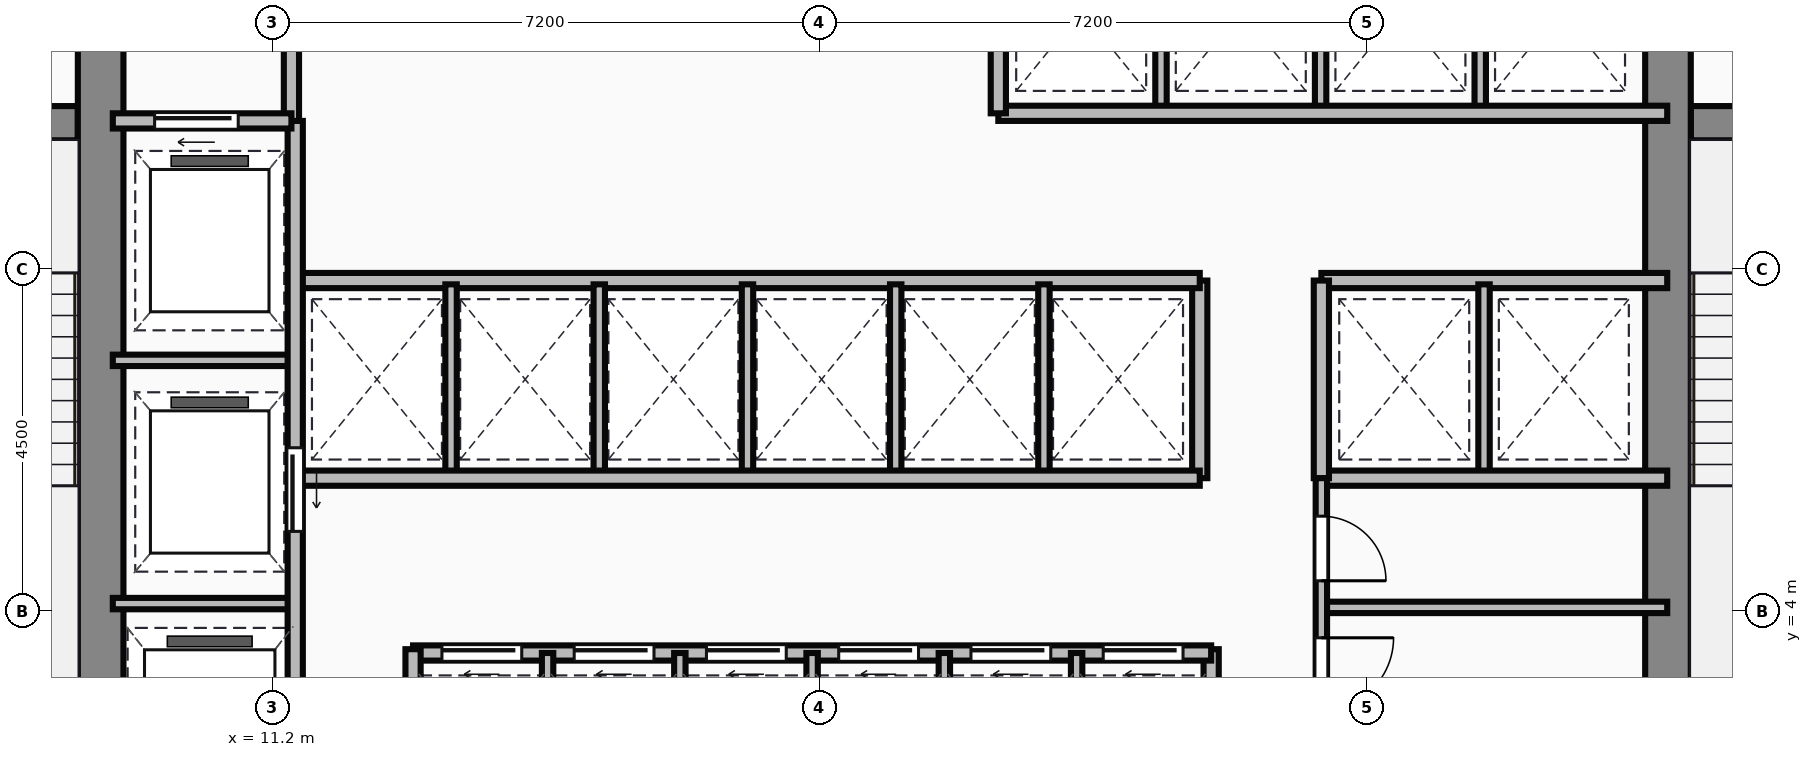
"""IFC4 building model, lengths in metres.
Left out: names, types, materials, properties, quantities, classifications, styles, units other than length and angle.
Written with IfcOpenShell. Run it as: python <this file> out.ifc"""

import sys

from ifc_helpers import new_model, si_unit, direction, frame, frame_2d, origin, place, context, subcontext, project, spatial, rectangle, extrude, source, transform, mapped, element, fill, save


model = new_model("IFC4")
c1 = context("Model", 3, precision=1e-05, world=origin(), true_north=direction((0.0, 1.0)))
c2 = subcontext(c1, "Body", "Model", "MODEL_VIEW")
j1 = project(units=[si_unit("LENGTHUNIT", "METRE"), si_unit("PLANEANGLEUNIT", "RADIAN")], contexts=[c1])
p1 = place(None, origin())
s1 = spatial("IfcSite", under=j1, at=p1, CompositionType="ELEMENT")
p2 = place(p1, origin())
s2 = spatial("IfcBuilding", under=s1, at=p2, CompositionType="ELEMENT")
p3 = place(p2, frame((0.0, 0.0, 69.0)))
s3 = spatial("IfcBuildingStorey", under=s2, at=p3, CompositionType="ELEMENT", Elevation=69.0)
m1 = source(origin(), c2, "Body", "SweptSolid", [
    extrude(rectangle(XDim=12.2, YDim=0.6, at=frame_2d((6.1, 0.0))), origin(), (0.0, 0.0, 1.0), 3.65),
])
for number, where, z_axis, x_axis in (
    (1, (8.94, 0.9, 0.0), (0.0, 0.0, 1.0), (0.0, 1.0, 0.0)),
    (2, (29.56, 0.9, 0.0), (0.0, 0.0, 1.0), (0.0, 1.0, 0.0)),
):
    element("IfcWall", number, at=place(p3, frame(where, z_axis=z_axis, x_axis=x_axis)), inside=s3, PredefinedType="SHEAR", context=c2, shape_type="MappedRepresentation", body=[
        mapped(m1, transform((0.0, 0.0, 0.0))),
    ])
m2 = source(origin(), c2, "Body", "SweptSolid", [
    extrude(rectangle(XDim=3.39, YDim=0.45, at=frame_2d((1.695, 0.0))), origin(), (0.0, 0.0, 1.0), 3.65),
])
p4 = place(p3, frame((5.25, 10.42, 0.0), z_axis=(0.0, 0.0, 1.0), x_axis=(1.0, 0.0, 0.0)))
e3 = element("IfcWall", 3, at=p4, inside=s3, PredefinedType="SHEAR", context=c2, shape_type="MappedRepresentation", body=[
    mapped(m2, transform((0.0, 0.0, 0.0))),
])
p5 = place(p4, frame((1.05, 0.0, 0.0)))
e4 = element("IfcOpeningElement", 4, at=p5, cuts=e3, PredefinedType="OPENING", context=c2, shape_type="SweptSolid", body=[
    extrude(rectangle(XDim=1.1, YDim=2.15, at=frame_2d((0.55, 1.075))), frame((0.0, 0.235, 0.0), z_axis=(0.0, -1.0, 0.0), x_axis=(1.0, 0.0, 0.0)), (0.0, 0.0, 1.0), 0.47),
])
p6 = place(p3, frame((29.86, 10.42, 0.0), z_axis=(0.0, 0.0, 1.0), x_axis=(1.0, 0.0, 0.0)))
e5 = element("IfcWall", 5, at=p6, inside=s3, PredefinedType="SHEAR", context=c2, shape_type="MappedRepresentation", body=[
    mapped(m2, transform((0.0, 0.0, 0.0))),
])
p7 = place(p6, frame((1.1, 0.0, 0.0)))
e6 = element("IfcOpeningElement", 6, at=p7, cuts=e5, PredefinedType="OPENING", context=c2, shape_type="SweptSolid", body=[
    extrude(rectangle(XDim=1.1, YDim=2.15, at=frame_2d((0.55, 1.075))), frame((0.0, 0.235, 0.0), z_axis=(0.0, -1.0, 0.0), x_axis=(1.0, 0.0, 0.0)), (0.0, 0.0, 1.0), 0.47),
])
m3 = source(origin(), c2, "Body", "SweptSolid", [
    extrude(rectangle(XDim=3.18, YDim=0.2, at=frame_2d((1.59, 0.0))), origin(), (0.0, 0.0, 1.0), 3.4),
])
p8 = place(p3, frame((11.45, 10.42, 0.0), z_axis=(0.0, 0.0, 1.0), x_axis=(0.0, 1.0, 0.0)))
e7 = element("IfcWall", 7, at=p8, inside=s3, PredefinedType="PARTITIONING", context=c2, shape_type="MappedRepresentation", body=[
    mapped(m3, transform((0.0, 0.0, 0.0))),
])
m4 = source(origin(), c2, "Body", "SweptSolid", [
    extrude(rectangle(XDim=2.35, YDim=0.2, at=frame_2d((1.175, 0.0))), origin(), (0.0, 0.0, 1.0), 3.4),
])
p9 = place(p3, frame((9.1, 10.45, 0.0), z_axis=(0.0, 0.0, 1.0), x_axis=(1.0, 0.0, 0.0)))
e8 = element("IfcWall", 8, at=p9, inside=s3, PredefinedType="PARTITIONING", context=c2, shape_type="MappedRepresentation", body=[
    mapped(m4, transform((0.0, 0.0, 0.0))),
])
p10 = place(p9, frame((0.55, 0.0, 0.0)))
e9 = element("IfcOpeningElement", 9, at=p10, cuts=e8, PredefinedType="OPENING", context=c2, shape_type="SweptSolid", body=[
    extrude(rectangle(XDim=1.1, YDim=2.15, at=frame_2d((0.55, 1.075))), frame((0.0, 0.11, 0.0), z_axis=(0.0, -1.0, 0.0), x_axis=(1.0, 0.0, 0.0)), (0.0, 0.0, 1.0), 0.22),
])
m5 = source(origin(), c2, "Body", "SweptSolid", [
    extrude(rectangle(XDim=9.6, YDim=0.2, at=frame_2d((4.8, 0.0))), origin(), (0.0, 0.0, 1.0), 3.4),
])
p11 = place(p3, frame((11.5, 0.85, 0.0), z_axis=(0.0, 0.0, 1.0), x_axis=(0.0, 1.0, 0.0)))
e10 = element("IfcWall", 10, at=p11, inside=s3, PredefinedType="PARTITIONING", context=c2, shape_type="MappedRepresentation", body=[
    mapped(m5, transform((0.0, 0.0, 0.0))),
])
p12 = place(p11, frame((4.2, 0.0, 0.0)))
e11 = element("IfcOpeningElement", 11, at=p12, cuts=e10, PredefinedType="OPENING", context=c2, shape_type="SweptSolid", body=[
    extrude(rectangle(XDim=1.1, YDim=2.15, at=frame_2d((0.55, 1.075))), frame((0.0, 0.11, 0.0), z_axis=(0.0, -1.0, 0.0), x_axis=(1.0, 0.0, 0.0)), (0.0, 0.0, 1.0), 0.22),
])
p13 = place(p11, frame((0.9, 0.0, 0.0)))
e12 = element("IfcOpeningElement", 12, at=p13, cuts=e10, PredefinedType="OPENING", context=c2, shape_type="SweptSolid", body=[
    extrude(rectangle(XDim=1.2, YDim=2.15, at=frame_2d((0.6, 1.075))), frame((0.0, 0.11, 0.0), z_axis=(0.0, -1.0, 0.0), x_axis=(1.0, 0.0, 0.0)), (0.0, 0.0, 1.0), 0.22),
])
m6 = source(origin(), c2, "Body", "SweptSolid", [
    extrude(rectangle(XDim=2.4, YDim=0.15, at=frame_2d((1.2, 0.0))), origin(), (0.0, 0.0, 1.0), 3.4),
])
for number, where, z_axis, x_axis in (
    (13, (9.1, 4.1, 0.0), (0.0, 0.0, 1.0), (1.0, 0.0, 0.0)),
    (14, (9.1, 7.3, 0.0), (0.0, 0.0, 1.0), (1.0, 0.0, 0.0)),
):
    element("IfcWall", number, at=place(p3, frame(where, z_axis=z_axis, x_axis=x_axis)), inside=s3, PredefinedType="PARTITIONING", context=c2, shape_type="MappedRepresentation", body=[
        mapped(m6, transform((0.0, 0.0, 0.0))),
    ])
m7 = source(origin(), c2, "Body", "SweptSolid", [
    extrude(rectangle(XDim=2.65, YDim=0.2, at=frame_2d((1.325, 0.0))), origin(), (0.0, 0.0, 1.0), 3.4),
])
p14 = place(p3, frame((13.05, 0.85, 0.0), z_axis=(0.0, 0.0, 1.0), x_axis=(0.0, 1.0, 0.0)))
e15 = element("IfcWall", 15, at=p14, inside=s3, PredefinedType="PARTITIONING", context=c2, shape_type="MappedRepresentation", body=[
    mapped(m7, transform((0.0, 0.0, 0.0))),
])
m8 = source(origin(), c2, "Body", "SweptSolid", [
    extrude(rectangle(XDim=10.5, YDim=0.2, at=frame_2d((5.25, 0.0))), origin(), (0.0, 0.0, 1.0), 3.4),
])
p15 = place(p3, frame((13.05, 3.45, 0.0), z_axis=(0.0, 0.0, 1.0), x_axis=(1.0, 0.0, 0.0)))
e16 = element("IfcWall", 16, at=p15, inside=s3, PredefinedType="PARTITIONING", context=c2, shape_type="MappedRepresentation", body=[
    mapped(m8, transform((0.0, 0.0, 0.0))),
])
p16 = place(p15, frame((0.38, 0.0, 0.0)))
e17 = element("IfcOpeningElement", 17, at=p16, cuts=e16, PredefinedType="OPENING", context=c2, shape_type="SweptSolid", body=[
    extrude(rectangle(XDim=1.05, YDim=2.15, at=frame_2d((0.525, 1.075))), frame((0.0, 0.11, 0.0), z_axis=(0.0, -1.0, 0.0), x_axis=(1.0, 0.0, 0.0)), (0.0, 0.0, 1.0), 0.22),
])
p17 = place(p15, frame((2.12, 0.0, 0.0)))
e18 = element("IfcOpeningElement", 18, at=p17, cuts=e16, PredefinedType="OPENING", context=c2, shape_type="SweptSolid", body=[
    extrude(rectangle(XDim=1.05, YDim=2.15, at=frame_2d((0.525, 1.075))), frame((0.0, 0.11, 0.0), z_axis=(0.0, -1.0, 0.0), x_axis=(1.0, 0.0, 0.0)), (0.0, 0.0, 1.0), 0.22),
])
p18 = place(p15, frame((3.86, 0.0, 0.0)))
e19 = element("IfcOpeningElement", 19, at=p18, cuts=e16, PredefinedType="OPENING", context=c2, shape_type="SweptSolid", body=[
    extrude(rectangle(XDim=1.05, YDim=2.15, at=frame_2d((0.525, 1.075))), frame((0.0, 0.11, 0.0), z_axis=(0.0, -1.0, 0.0), x_axis=(1.0, 0.0, 0.0)), (0.0, 0.0, 1.0), 0.22),
])
p19 = place(p15, frame((5.6, 0.0, 0.0)))
e20 = element("IfcOpeningElement", 20, at=p19, cuts=e16, PredefinedType="OPENING", context=c2, shape_type="SweptSolid", body=[
    extrude(rectangle(XDim=1.05, YDim=2.15, at=frame_2d((0.525, 1.075))), frame((0.0, 0.11, 0.0), z_axis=(0.0, -1.0, 0.0), x_axis=(1.0, 0.0, 0.0)), (0.0, 0.0, 1.0), 0.22),
])
p20 = place(p15, frame((7.34, 0.0, 0.0)))
e21 = element("IfcOpeningElement", 21, at=p20, cuts=e16, PredefinedType="OPENING", context=c2, shape_type="SweptSolid", body=[
    extrude(rectangle(XDim=1.05, YDim=2.15, at=frame_2d((0.525, 1.075))), frame((0.0, 0.11, 0.0), z_axis=(0.0, -1.0, 0.0), x_axis=(1.0, 0.0, 0.0)), (0.0, 0.0, 1.0), 0.22),
])
p21 = place(p15, frame((9.08, 0.0, 0.0)))
e22 = element("IfcOpeningElement", 22, at=p21, cuts=e16, PredefinedType="OPENING", context=c2, shape_type="SweptSolid", body=[
    extrude(rectangle(XDim=1.05, YDim=2.15, at=frame_2d((0.525, 1.075))), frame((0.0, 0.11, 0.0), z_axis=(0.0, -1.0, 0.0), x_axis=(1.0, 0.0, 0.0)), (0.0, 0.0, 1.0), 0.22),
])
p22 = place(p3, frame((23.55, 0.85, 0.0), z_axis=(0.0, 0.0, 1.0), x_axis=(0.0, 1.0, 0.0)))
e23 = element("IfcWall", 23, at=p22, inside=s3, PredefinedType="PARTITIONING", context=c2, shape_type="MappedRepresentation", body=[
    mapped(m7, transform((0.0, 0.0, 0.0))),
])
m9 = source(origin(), c2, "Body", "SweptSolid", [
    extrude(rectangle(XDim=2.6, YDim=0.15, at=frame_2d((1.3, 0.0))), origin(), (0.0, 0.0, 1.0), 3.4),
])
for number, where, z_axis, x_axis in (
    (24, (14.82, 0.85, 0.0), (0.0, 0.0, 1.0), (0.0, 1.0, 0.0)),
    (25, (16.56, 0.85, 0.0), (0.0, 0.0, 1.0), (0.0, 1.0, 0.0)),
    (26, (18.3, 0.85, 0.0), (0.0, 0.0, 1.0), (0.0, 1.0, 0.0)),
    (27, (20.04, 0.85, 0.0), (0.0, 0.0, 1.0), (0.0, 1.0, 0.0)),
    (28, (21.78, 0.85, 0.0), (0.0, 0.0, 1.0), (0.0, 1.0, 0.0)),
):
    element("IfcWall", number, at=place(p3, frame(where, z_axis=z_axis, x_axis=x_axis)), inside=s3, PredefinedType="PARTITIONING", context=c2, shape_type="MappedRepresentation", body=[
        mapped(m9, transform((0.0, 0.0, 0.0))),
    ])
m10 = source(origin(), c2, "Body", "SweptSolid", [
    extrude(rectangle(XDim=11.85, YDim=0.2, at=frame_2d((5.925, 0.0))), origin(), (0.0, 0.0, 1.0), 3.4),
])
for number, where, z_axis, x_axis in (
    (29, (11.55, 5.75, 0.0), (0.0, 0.0, 1.0), (1.0, 0.0, 0.0)),
    (30, (11.55, 8.35, 0.0), (0.0, 0.0, 1.0), (1.0, 0.0, 0.0)),
):
    element("IfcWall", number, at=place(p3, frame(where, z_axis=z_axis, x_axis=x_axis)), inside=s3, PredefinedType="PARTITIONING", context=c2, shape_type="MappedRepresentation", body=[
        mapped(m10, transform((0.0, 0.0, 0.0))),
    ])
m11 = source(origin(), c2, "Body", "SweptSolid", [
    extrude(rectangle(XDim=2.6, YDim=0.2, at=frame_2d((1.3, 0.0))), origin(), (0.0, 0.0, 1.0), 3.4),
])
p23 = place(p3, frame((23.4, 5.75, 0.0), z_axis=(0.0, 0.0, 1.0), x_axis=(0.0, 1.0, 0.0)))
e31 = element("IfcWall", 31, at=p23, inside=s3, PredefinedType="PARTITIONING", context=c2, shape_type="MappedRepresentation", body=[
    mapped(m11, transform((0.0, 0.0, 0.0))),
])
m12 = source(origin(), c2, "Body", "SweptSolid", [
    extrude(rectangle(XDim=2.5, YDim=0.15, at=frame_2d((1.25, 0.0))), origin(), (0.0, 0.0, 1.0), 3.4),
])
for number, where, z_axis, x_axis in (
    (32, (13.55, 5.8, 0.0), (0.0, 0.0, 1.0), (0.0, 1.0, 0.0)),
    (33, (15.5, 5.8, 0.0), (0.0, 0.0, 1.0), (0.0, 1.0, 0.0)),
    (34, (17.45, 5.8, 0.0), (0.0, 0.0, 1.0), (0.0, 1.0, 0.0)),
    (35, (19.4, 5.8, 0.0), (0.0, 0.0, 1.0), (0.0, 1.0, 0.0)),
    (36, (21.35, 5.8, 0.0), (0.0, 0.0, 1.0), (0.0, 1.0, 0.0)),
):
    element("IfcWall", number, at=place(p3, frame(where, z_axis=z_axis, x_axis=x_axis)), inside=s3, PredefinedType="PARTITIONING", context=c2, shape_type="MappedRepresentation", body=[
        mapped(m12, transform((0.0, 0.0, 0.0))),
    ])
m13 = source(origin(), c2, "Body", "SweptSolid", [
    extrude(rectangle(XDim=8.8, YDim=0.2, at=frame_2d((4.4, 0.0))), origin(), (0.0, 0.0, 1.0), 3.4),
])
p24 = place(p3, frame((20.75, 10.55, 0.0), z_axis=(0.0, 0.0, 1.0), x_axis=(1.0, 0.0, 0.0)))
e37 = element("IfcWall", 37, at=p24, inside=s3, PredefinedType="PARTITIONING", context=c2, shape_type="MappedRepresentation", body=[
    mapped(m13, transform((0.0, 0.0, 0.0))),
])
m14 = source(origin(), c2, "Body", "SweptSolid", [
    extrude(rectangle(XDim=3.0, YDim=0.2, at=frame_2d((1.5, 0.0))), origin(), (0.0, 0.0, 1.0), 3.4),
])
p25 = place(p3, frame((20.75, 10.55, 0.0), z_axis=(0.0, 0.0, 1.0), x_axis=(0.0, 1.0, 0.0)))
e38 = element("IfcWall", 38, at=p25, inside=s3, PredefinedType="PARTITIONING", context=c2, shape_type="MappedRepresentation", body=[
    mapped(m14, transform((0.0, 0.0, 0.0))),
])
m15 = source(origin(), c2, "Body", "SweptSolid", [
    extrude(rectangle(XDim=2.85, YDim=0.15, at=frame_2d((1.425, 0.0))), origin(), (0.0, 0.0, 1.0), 3.4),
])
for number, where, z_axis, x_axis in (
    (39, (22.89, 10.6, 0.0), (0.0, 0.0, 1.0), (0.0, 1.0, 0.0)),
    (40, (24.99, 10.6, 0.0), (0.0, 0.0, 1.0), (0.0, 1.0, 0.0)),
    (41, (27.09, 10.6, 0.0), (0.0, 0.0, 1.0), (0.0, 1.0, 0.0)),
):
    element("IfcWall", number, at=place(p3, frame(where, z_axis=z_axis, x_axis=x_axis)), inside=s3, PredefinedType="PARTITIONING", context=c2, shape_type="MappedRepresentation", body=[
        mapped(m15, transform((0.0, 0.0, 0.0))),
    ])
m16 = source(origin(), c2, "Body", "SweptSolid", [
    extrude(rectangle(XDim=4.55, YDim=0.2, at=frame_2d((2.275, 0.0))), origin(), (0.0, 0.0, 1.0), 3.4),
])
for number, where, z_axis, x_axis in (
    (42, (25.0, 8.35, 0.0), (0.0, 0.0, 1.0), (1.0, 0.0, 0.0)),
    (43, (25.0, 5.75, 0.0), (0.0, 0.0, 1.0), (1.0, 0.0, 0.0)),
):
    element("IfcWall", number, at=place(p3, frame(where, z_axis=z_axis, x_axis=x_axis)), inside=s3, PredefinedType="PARTITIONING", context=c2, shape_type="MappedRepresentation", body=[
        mapped(m16, transform((0.0, 0.0, 0.0))),
    ])
p26 = place(p3, frame((25.0, 5.75, 0.0), z_axis=(0.0, 0.0, 1.0), x_axis=(0.0, 1.0, 0.0)))
e44 = element("IfcWall", 44, at=p26, inside=s3, PredefinedType="PARTITIONING", context=c2, shape_type="MappedRepresentation", body=[
    mapped(m11, transform((0.0, 0.0, 0.0))),
])
p27 = place(p3, frame((27.14, 5.8, 0.0), z_axis=(0.0, 0.0, 1.0), x_axis=(0.0, 1.0, 0.0)))
e45 = element("IfcWall", 45, at=p27, inside=s3, PredefinedType="PARTITIONING", context=c2, shape_type="MappedRepresentation", body=[
    mapped(m12, transform((0.0, 0.0, 0.0))),
])
m17 = source(origin(), c2, "Body", "SweptSolid", [
    extrude(rectangle(XDim=4.9, YDim=0.15, at=frame_2d((2.45, 0.0))), origin(), (0.0, 0.0, 1.0), 3.4),
])
p28 = place(p3, frame((25.0, 0.85, 0.0), z_axis=(0.0, 0.0, 1.0), x_axis=(0.0, 1.0, 0.0)))
e46 = element("IfcWall", 46, at=p28, inside=s3, PredefinedType="PARTITIONING", context=c2, shape_type="MappedRepresentation", body=[
    mapped(m17, transform((0.0, 0.0, 0.0))),
])
p29 = place(p28, frame((1.85, 0.0, 0.0)))
e47 = element("IfcOpeningElement", 47, at=p29, cuts=e46, PredefinedType="OPENING", context=c2, shape_type="SweptSolid", body=[
    extrude(rectangle(XDim=0.95, YDim=2.15, at=frame_2d((0.475, 1.075))), frame((0.0, 0.085, 0.0), z_axis=(0.0, -1.0, 0.0), x_axis=(1.0, 0.0, 0.0)), (0.0, 0.0, 1.0), 0.17),
])
p30 = place(p28, frame((3.55, 0.0, 0.0)))
e48 = element("IfcOpeningElement", 48, at=p30, cuts=e46, PredefinedType="OPENING", context=c2, shape_type="SweptSolid", body=[
    extrude(rectangle(XDim=0.85, YDim=2.15, at=frame_2d((0.425, 1.075))), frame((0.0, 0.085, 0.0), z_axis=(0.0, -1.0, 0.0), x_axis=(1.0, 0.0, 0.0)), (0.0, 0.0, 1.0), 0.17),
])
m18 = source(origin(), c2, "Body", "SweptSolid", [
    extrude(rectangle(XDim=4.55, YDim=0.15, at=frame_2d((2.275, 0.0))), origin(), (0.0, 0.0, 1.0), 3.4),
])
p31 = place(p3, frame((25.0, 4.05, 0.0), z_axis=(0.0, 0.0, 1.0), x_axis=(1.0, 0.0, 0.0)))
e49 = element("IfcWall", 49, at=p31, inside=s3, PredefinedType="PARTITIONING", context=c2, shape_type="MappedRepresentation", body=[
    mapped(m18, transform((0.0, 0.0, 0.0))),
])
m19 = source(origin(), c2, "Body", "SweptSolid", [
    extrude(rectangle(XDim=1.1, YDim=2.15, at=frame_2d((0.55, 1.075))), frame((0.0, 0.025, 0.0), z_axis=(0.0, -1.0, 0.0), x_axis=(1.0, 0.0, 0.0)), (0.0, 0.0, 1.0), 0.05),
])
p32 = place(p10, origin())
e50 = element("IfcDoor", 50, at=p32, inside=s3, OperationType="SLIDING_TO_LEFT", PredefinedType="DOOR", context=c2, shape_type="MappedRepresentation", body=[
    mapped(m19, transform((0.0, 0.0, 0.0))),
])
fill(e9, e50)
p33 = place(p12, frame((1.1, 0.0, 0.0), z_axis=(0.0, 0.0, 1.0), x_axis=(-1.0, 0.0, 0.0)))
e51 = element("IfcDoor", 51, at=p33, inside=s3, OperationType="SLIDING_TO_LEFT", PredefinedType="DOOR", context=c2, shape_type="MappedRepresentation", body=[
    mapped(m19, transform((0.0, 0.0, 0.0))),
])
fill(e11, e51)
m20 = source(origin(), c2, "Body", "SweptSolid", [
    extrude(rectangle(XDim=1.05, YDim=2.15, at=frame_2d((0.525, 1.075))), frame((0.0, 0.025, 0.0), z_axis=(0.0, -1.0, 0.0), x_axis=(1.0, 0.0, 0.0)), (0.0, 0.0, 1.0), 0.05),
])
p34 = place(p16, origin())
e52 = element("IfcDoor", 52, at=p34, inside=s3, OperationType="SLIDING_TO_LEFT", PredefinedType="DOOR", context=c2, shape_type="MappedRepresentation", body=[
    mapped(m20, transform((0.0, 0.0, 0.0))),
])
fill(e17, e52)
p35 = place(p17, origin())
e53 = element("IfcDoor", 53, at=p35, inside=s3, OperationType="SLIDING_TO_LEFT", PredefinedType="DOOR", context=c2, shape_type="MappedRepresentation", body=[
    mapped(m20, transform((0.0, 0.0, 0.0))),
])
fill(e18, e53)
p36 = place(p18, origin())
e54 = element("IfcDoor", 54, at=p36, inside=s3, OperationType="SLIDING_TO_LEFT", PredefinedType="DOOR", context=c2, shape_type="MappedRepresentation", body=[
    mapped(m20, transform((0.0, 0.0, 0.0))),
])
fill(e19, e54)
p37 = place(p19, origin())
e55 = element("IfcDoor", 55, at=p37, inside=s3, OperationType="SLIDING_TO_LEFT", PredefinedType="DOOR", context=c2, shape_type="MappedRepresentation", body=[
    mapped(m20, transform((0.0, 0.0, 0.0))),
])
fill(e20, e55)
p38 = place(p20, origin())
e56 = element("IfcDoor", 56, at=p38, inside=s3, OperationType="SLIDING_TO_LEFT", PredefinedType="DOOR", context=c2, shape_type="MappedRepresentation", body=[
    mapped(m20, transform((0.0, 0.0, 0.0))),
])
fill(e21, e56)
p39 = place(p21, origin())
e57 = element("IfcDoor", 57, at=p39, inside=s3, OperationType="SLIDING_TO_LEFT", PredefinedType="DOOR", context=c2, shape_type="MappedRepresentation", body=[
    mapped(m20, transform((0.0, 0.0, 0.0))),
])
fill(e22, e57)
m21 = source(origin(), c2, "Body", "SweptSolid", [
    extrude(rectangle(XDim=0.95, YDim=2.15, at=frame_2d((0.475, 1.075))), frame((0.0, 0.025, 0.0), z_axis=(0.0, -1.0, 0.0), x_axis=(1.0, 0.0, 0.0)), (0.0, 0.0, 1.0), 0.05),
])
p40 = place(p29, origin())
e58 = element("IfcDoor", 58, at=p40, inside=s3, OperationType="SINGLE_SWING_RIGHT", PredefinedType="DOOR", context=c2, shape_type="MappedRepresentation", body=[
    mapped(m21, transform((0.0, 0.0, 0.0))),
])
fill(e47, e58)
m22 = source(origin(), c2, "Body", "SweptSolid", [
    extrude(rectangle(XDim=0.85, YDim=2.15, at=frame_2d((0.425, 1.075))), frame((0.0, 0.025, 0.0), z_axis=(0.0, -1.0, 0.0), x_axis=(1.0, 0.0, 0.0)), (0.0, 0.0, 1.0), 0.05),
])
p41 = place(p30, origin())
e59 = element("IfcDoor", 59, at=p41, inside=s3, OperationType="SINGLE_SWING_LEFT", PredefinedType="DOOR", context=c2, shape_type="MappedRepresentation", body=[
    mapped(m22, transform((0.0, 0.0, 0.0))),
])
fill(e48, e59)
save(model, sys.argv[1])
